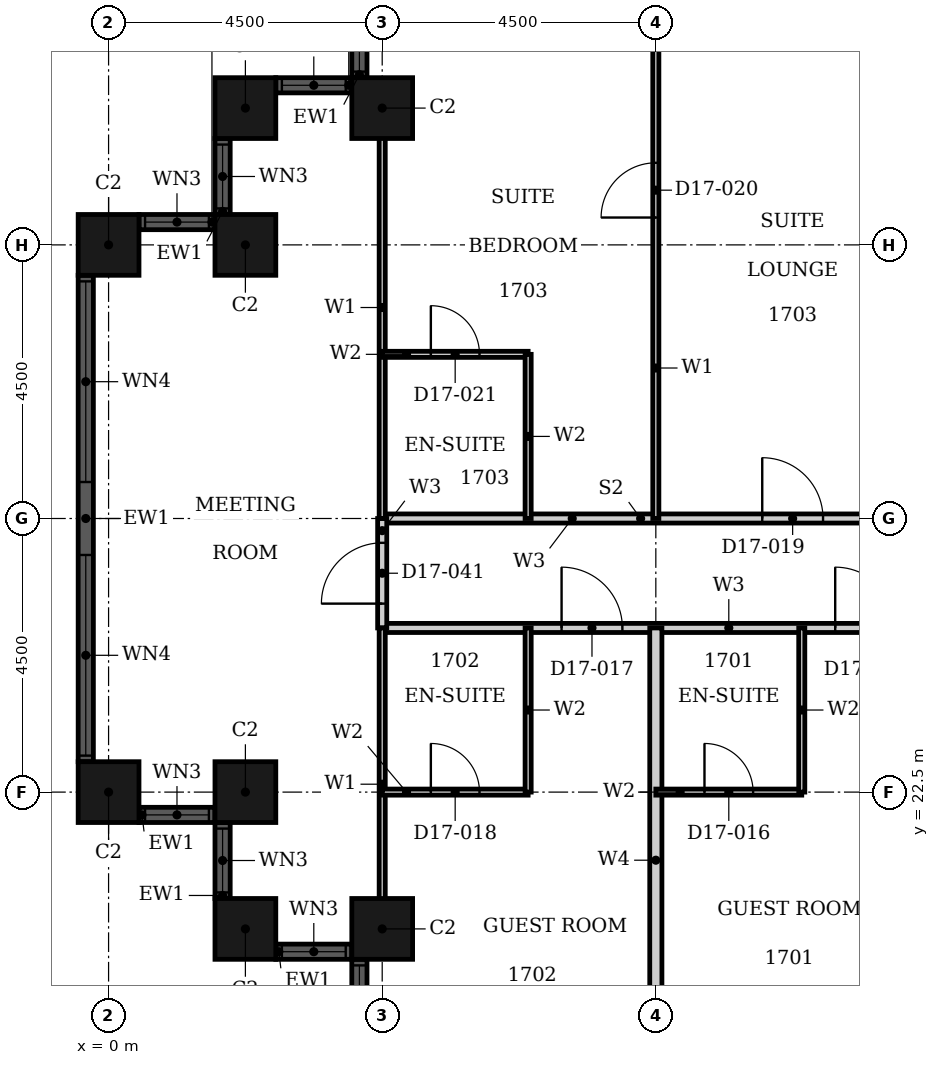
"""IFC4 building model, lengths in metres.
Left out: names, types, materials, properties, quantities, classifications, styles, units other than length and angle.
Written with IfcOpenShell. Run it as: python <this file> out.ifc"""

import sys

from ifc_helpers import new_model, si_unit, direction, frame, frame_2d, origin, origin_2d, place, context, subcontext, project, spatial, rectangle, hollow_rectangle, extrude, element, fill, save


model = new_model("IFC4")
c1 = context("Model", 3, precision=1e-05, world=origin(), true_north=direction((0.0, 1.0)))
c2 = subcontext(c1, "Body", "Model", "MODEL_VIEW")
j1 = project(units=[si_unit("LENGTHUNIT", "METRE"), si_unit("PLANEANGLEUNIT", "RADIAN")], contexts=[c1])
p1 = place(None, origin())
s1 = spatial("IfcSite", under=j1, at=p1, CompositionType="ELEMENT")
p2 = place(p1, origin())
s2 = spatial("IfcBuilding", under=s1, at=p2, CompositionType="ELEMENT")
p3 = place(p2, frame((0.0, 0.0, 74.4)))
s3 = spatial("IfcBuildingStorey", under=s2, at=p3, CompositionType="ELEMENT", Elevation=74.4)
for number, where, z_axis, x_axis in (
    (1, (4.5, 33.75, 0.0), (0.0, 0.0, 1.0), (1.0, 0.0, 0.0)),
    (2, (2.25, 33.75, 0.0), (0.0, 0.0, 1.0), (1.0, 0.0, 0.0)),
    (3, (2.25, 31.5, 0.0), (0.0, 0.0, 1.0), (1.0, 0.0, 0.0)),
    (4, (0.0, 31.5, 0.0), (0.0, 0.0, 1.0), (1.0, 0.0, 0.0)),
    (5, (0.0, 22.5, 0.0), (0.0, 0.0, 1.0), (1.0, 0.0, 0.0)),
    (6, (2.25, 22.5, 0.0), (0.0, 0.0, 1.0), (1.0, 0.0, 0.0)),
    (7, (2.25, 20.25, 0.0), (0.0, 0.0, 1.0), (1.0, 0.0, 0.0)),
    (8, (4.5, 20.25, 0.0), (0.0, 0.0, 1.0), (1.0, 0.0, 0.0)),
):
    element("IfcColumn", number, at=place(p3, frame(where, z_axis=z_axis, x_axis=x_axis)), inside=s3, PredefinedType="COLUMN", context=c2, shape_type="SweptSolid", body=[
        extrude(hollow_rectangle(XDim=1.0, YDim=1.0, WallThickness=0.032, at=origin_2d()), origin(), (0.0, 0.0, 1.0), 3.6),
    ])
p4 = place(p3, frame((4.125, 35.5, 0.0), z_axis=(0.0, 0.0, 1.0), x_axis=(0.0, -1.0, 0.0)))
e9 = element("IfcWall", 9, at=p4, inside=s3, PredefinedType="SOLIDWALL", context=c2, shape_type="SweptSolid", body=[
    extrude(rectangle(XDim=1.25, YDim=0.25, at=frame_2d((0.625, 0.0))), origin(), (0.0, 0.0, 1.0), 3.6),
])
p5 = place(p4, frame((0.1, 0.0, 0.9)))
e10 = element("IfcOpeningElement", 10, at=p5, cuts=e9, PredefinedType="OPENING", context=c2, shape_type="SweptSolid", body=[
    extrude(rectangle(XDim=1.05, YDim=2.08, at=frame_2d((0.525, 1.04))), frame((0.0, 0.135, 0.0), z_axis=(0.0, -1.0, 0.0), x_axis=(1.0, 0.0, 0.0)), (0.0, 0.0, 1.0), 0.27),
])
p6 = place(p3, frame((4.0, 34.125, 0.0), z_axis=(0.0, 0.0, 1.0), x_axis=(-1.0, 0.0, 0.0)))
e11 = element("IfcWall", 11, at=p6, inside=s3, PredefinedType="SOLIDWALL", context=c2, shape_type="SweptSolid", body=[
    extrude(rectangle(XDim=1.25, YDim=0.25, at=frame_2d((0.625, 0.0))), origin(), (0.0, 0.0, 1.0), 3.6),
])
p7 = place(p6, frame((0.1, 0.0, 0.9)))
e12 = element("IfcOpeningElement", 12, at=p7, cuts=e11, PredefinedType="OPENING", context=c2, shape_type="SweptSolid", body=[
    extrude(rectangle(XDim=1.05, YDim=2.08, at=frame_2d((0.525, 1.04))), frame((0.0, 0.135, 0.0), z_axis=(0.0, -1.0, 0.0), x_axis=(1.0, 0.0, 0.0)), (0.0, 0.0, 1.0), 0.27),
])
p8 = place(p3, frame((1.875, 33.25, 0.0), z_axis=(0.0, 0.0, 1.0), x_axis=(0.0, -1.0, 0.0)))
e13 = element("IfcWall", 13, at=p8, inside=s3, PredefinedType="SOLIDWALL", context=c2, shape_type="SweptSolid", body=[
    extrude(rectangle(XDim=1.25, YDim=0.25, at=frame_2d((0.625, 0.0))), origin(), (0.0, 0.0, 1.0), 3.6),
])
p9 = place(p8, frame((0.1, 0.0, 0.9)))
e14 = element("IfcOpeningElement", 14, at=p9, cuts=e13, PredefinedType="OPENING", context=c2, shape_type="SweptSolid", body=[
    extrude(rectangle(XDim=1.05, YDim=2.08, at=frame_2d((0.525, 1.04))), frame((0.0, 0.135, 0.0), z_axis=(0.0, -1.0, 0.0), x_axis=(1.0, 0.0, 0.0)), (0.0, 0.0, 1.0), 0.27),
])
p10 = place(p3, frame((1.75, 31.875, 0.0), z_axis=(0.0, 0.0, 1.0), x_axis=(-1.0, 0.0, 0.0)))
e15 = element("IfcWall", 15, at=p10, inside=s3, PredefinedType="SOLIDWALL", context=c2, shape_type="SweptSolid", body=[
    extrude(rectangle(XDim=1.25, YDim=0.25, at=frame_2d((0.625, 0.0))), origin(), (0.0, 0.0, 1.0), 3.6),
])
p11 = place(p10, frame((0.1, 0.0, 0.9)))
e16 = element("IfcOpeningElement", 16, at=p11, cuts=e15, PredefinedType="OPENING", context=c2, shape_type="SweptSolid", body=[
    extrude(rectangle(XDim=1.05, YDim=2.08, at=frame_2d((0.525, 1.04))), frame((0.0, 0.135, 0.0), z_axis=(0.0, -1.0, 0.0), x_axis=(1.0, 0.0, 0.0)), (0.0, 0.0, 1.0), 0.27),
])
p12 = place(p3, frame((-0.375, 31.0, 0.0), z_axis=(0.0, 0.0, 1.0), x_axis=(0.0, -1.0, 0.0)))
e17 = element("IfcWall", 17, at=p12, inside=s3, PredefinedType="SOLIDWALL", context=c2, shape_type="SweptSolid", body=[
    extrude(rectangle(XDim=8.0, YDim=0.25, at=frame_2d((4.0, 0.0))), origin(), (0.0, 0.0, 1.0), 3.6),
])
p13 = place(p12, frame((0.1, 0.0, 0.9)))
e18 = element("IfcOpeningElement", 18, at=p13, cuts=e17, PredefinedType="OPENING", context=c2, shape_type="SweptSolid", body=[
    extrude(rectangle(XDim=3.3, YDim=2.08, at=frame_2d((1.65, 1.04))), frame((0.0, 0.135, 0.0), z_axis=(0.0, -1.0, 0.0), x_axis=(1.0, 0.0, 0.0)), (0.0, 0.0, 1.0), 0.27),
])
p14 = place(p12, frame((4.6, 0.0, 0.9)))
e19 = element("IfcOpeningElement", 19, at=p14, cuts=e17, PredefinedType="OPENING", context=c2, shape_type="SweptSolid", body=[
    extrude(rectangle(XDim=3.3, YDim=2.08, at=frame_2d((1.65, 1.04))), frame((0.0, 0.135, 0.0), z_axis=(0.0, -1.0, 0.0), x_axis=(1.0, 0.0, 0.0)), (0.0, 0.0, 1.0), 0.27),
])
p15 = place(p3, frame((0.5, 22.125, 0.0), z_axis=(0.0, 0.0, 1.0), x_axis=(1.0, 0.0, 0.0)))
e20 = element("IfcWall", 20, at=p15, inside=s3, PredefinedType="SOLIDWALL", context=c2, shape_type="SweptSolid", body=[
    extrude(rectangle(XDim=1.25, YDim=0.25, at=frame_2d((0.625, 0.0))), origin(), (0.0, 0.0, 1.0), 3.6),
])
p16 = place(p15, frame((0.1, 0.0, 0.9)))
e21 = element("IfcOpeningElement", 21, at=p16, cuts=e20, PredefinedType="OPENING", context=c2, shape_type="SweptSolid", body=[
    extrude(rectangle(XDim=1.05, YDim=2.08, at=frame_2d((0.525, 1.04))), frame((0.0, 0.135, 0.0), z_axis=(0.0, -1.0, 0.0), x_axis=(1.0, 0.0, 0.0)), (0.0, 0.0, 1.0), 0.27),
])
p17 = place(p3, frame((1.875, 22.0, 0.0), z_axis=(0.0, 0.0, 1.0), x_axis=(0.0, -1.0, 0.0)))
e22 = element("IfcWall", 22, at=p17, inside=s3, PredefinedType="SOLIDWALL", context=c2, shape_type="SweptSolid", body=[
    extrude(rectangle(XDim=1.25, YDim=0.25, at=frame_2d((0.625, 0.0))), origin(), (0.0, 0.0, 1.0), 3.6),
])
p18 = place(p17, frame((0.1, 0.0, 0.9)))
e23 = element("IfcOpeningElement", 23, at=p18, cuts=e22, PredefinedType="OPENING", context=c2, shape_type="SweptSolid", body=[
    extrude(rectangle(XDim=1.05, YDim=2.08, at=frame_2d((0.525, 1.04))), frame((0.0, 0.135, 0.0), z_axis=(0.0, -1.0, 0.0), x_axis=(1.0, 0.0, 0.0)), (0.0, 0.0, 1.0), 0.27),
])
p19 = place(p3, frame((2.75, 19.875, 0.0), z_axis=(0.0, 0.0, 1.0), x_axis=(1.0, 0.0, 0.0)))
e24 = element("IfcWall", 24, at=p19, inside=s3, PredefinedType="SOLIDWALL", context=c2, shape_type="SweptSolid", body=[
    extrude(rectangle(XDim=1.25, YDim=0.25, at=frame_2d((0.625, 0.0))), origin(), (0.0, 0.0, 1.0), 3.6),
])
p20 = place(p19, frame((0.1, 0.0, 0.9)))
e25 = element("IfcOpeningElement", 25, at=p20, cuts=e24, PredefinedType="OPENING", context=c2, shape_type="SweptSolid", body=[
    extrude(rectangle(XDim=1.05, YDim=2.08, at=frame_2d((0.525, 1.04))), frame((0.0, 0.135, 0.0), z_axis=(0.0, -1.0, 0.0), x_axis=(1.0, 0.0, 0.0)), (0.0, 0.0, 1.0), 0.27),
])
p21 = place(p3, frame((4.125, 19.75, 0.0), z_axis=(0.0, 0.0, 1.0), x_axis=(0.0, -1.0, 0.0)))
e26 = element("IfcWall", 26, at=p21, inside=s3, PredefinedType="SOLIDWALL", context=c2, shape_type="SweptSolid", body=[
    extrude(rectangle(XDim=1.25, YDim=0.25, at=frame_2d((0.625, 0.0))), origin(), (0.0, 0.0, 1.0), 3.6),
])
p22 = place(p21, frame((0.1, 0.0, 0.9)))
e27 = element("IfcOpeningElement", 27, at=p22, cuts=e26, PredefinedType="OPENING", context=c2, shape_type="SweptSolid", body=[
    extrude(rectangle(XDim=1.05, YDim=2.08, at=frame_2d((0.525, 1.04))), frame((0.0, 0.135, 0.0), z_axis=(0.0, -1.0, 0.0), x_axis=(1.0, 0.0, 0.0)), (0.0, 0.0, 1.0), 0.27),
])
p23 = place(p3, frame((4.5, 25.2, 0.0), z_axis=(0.0, 0.0, 1.0), x_axis=(1.0, 0.0, 0.0)))
e28 = element("IfcWall", 28, at=p23, inside=s3, PredefinedType="PARTITIONING", context=c2, shape_type="SweptSolid", body=[
    extrude(rectangle(XDim=11.7, YDim=0.15, at=frame_2d((5.85, 0.0))), origin(), (0.0, 0.0, 1.0), 3.3),
])
p24 = place(p23, frame((7.45, 0.0, 0.0)))
e29 = element("IfcOpeningElement", 29, at=p24, cuts=e28, PredefinedType="OPENING", context=c2, shape_type="SweptSolid", body=[
    extrude(rectangle(XDim=1.0, YDim=2.1, at=frame_2d((0.5, 1.05))), frame((0.0, 0.085, 0.0), z_axis=(0.0, -1.0, 0.0), x_axis=(1.0, 0.0, 0.0)), (0.0, 0.0, 1.0), 0.17),
])
p25 = place(p23, frame((2.95, 0.0, 0.0)))
e30 = element("IfcOpeningElement", 30, at=p25, cuts=e28, PredefinedType="OPENING", context=c2, shape_type="SweptSolid", body=[
    extrude(rectangle(XDim=1.0, YDim=2.1, at=frame_2d((0.5, 1.05))), frame((0.0, 0.085, 0.0), z_axis=(0.0, -1.0, 0.0), x_axis=(1.0, 0.0, 0.0)), (0.0, 0.0, 1.0), 0.17),
])
p26 = place(p3, frame((4.5, 27.0, 0.0), z_axis=(0.0, 0.0, 1.0), x_axis=(1.0, 0.0, 0.0)))
e31 = element("IfcWall", 31, at=p26, inside=s3, PredefinedType="PARTITIONING", context=c2, shape_type="SweptSolid", body=[
    extrude(rectangle(XDim=11.7, YDim=0.15, at=frame_2d((5.85, 0.0))), origin(), (0.0, 0.0, 1.0), 2.58),
])
p27 = place(p26, frame((6.25, 0.0, 0.0)))
e32 = element("IfcOpeningElement", 32, at=p27, cuts=e31, PredefinedType="OPENING", context=c2, shape_type="SweptSolid", body=[
    extrude(rectangle(XDim=1.0, YDim=2.1, at=frame_2d((0.5, 1.05))), frame((0.0, 0.085, 0.0), z_axis=(0.0, -1.0, 0.0), x_axis=(1.0, 0.0, 0.0)), (0.0, 0.0, 1.0), 0.17),
])
p28 = place(p3, frame((4.5, 25.2, 0.0), z_axis=(0.0, 0.0, 1.0), x_axis=(0.0, 1.0, 0.0)))
e33 = element("IfcWall", 33, at=p28, inside=s3, PredefinedType="PARTITIONING", context=c2, shape_type="SweptSolid", body=[
    extrude(rectangle(XDim=1.8, YDim=0.15, at=frame_2d((0.9, 0.0))), origin(), (0.0, 0.0, 1.0), 3.3),
])
p29 = place(p28, frame((0.4, 0.0, 0.0)))
e34 = element("IfcOpeningElement", 34, at=p29, cuts=e33, PredefinedType="OPENING", context=c2, shape_type="SweptSolid", body=[
    extrude(rectangle(XDim=1.0, YDim=2.1, at=frame_2d((0.5, 1.05))), frame((0.0, 0.085, 0.0), z_axis=(0.0, -1.0, 0.0), x_axis=(1.0, 0.0, 0.0)), (0.0, 0.0, 1.0), 0.17),
])
p30 = place(p3, frame((4.5, 20.06, 0.0), z_axis=(0.0, 0.0, 1.0), x_axis=(0.0, 1.0, 0.0)))
e35 = element("IfcWall", 35, at=p30, inside=s3, PredefinedType="PARTITIONING", context=c2, shape_type="SweptSolid", body=[
    extrude(rectangle(XDim=5.14, YDim=0.1, at=frame_2d((2.57, 0.0))), origin(), (0.0, 0.0, 1.0), 3.3),
])
p31 = place(p3, frame((4.5, 27.0, 0.0), z_axis=(0.0, 0.0, 1.0), x_axis=(0.0, 1.0, 0.0)))
e36 = element("IfcWall", 36, at=p31, inside=s3, PredefinedType="PARTITIONING", context=c2, shape_type="SweptSolid", body=[
    extrude(rectangle(XDim=6.94, YDim=0.1, at=frame_2d((3.47, 0.0))), origin(), (0.0, 0.0, 1.0), 3.3),
])
p32 = place(p3, frame((9.0, 27.0, 0.0), z_axis=(0.0, 0.0, 1.0), x_axis=(0.0, 1.0, 0.0)))
e37 = element("IfcWall", 37, at=p32, inside=s3, PredefinedType="PARTITIONING", context=c2, shape_type="SweptSolid", body=[
    extrude(rectangle(XDim=9.44, YDim=0.1, at=frame_2d((4.72, 0.0))), origin(), (0.0, 0.0, 1.0), 3.3),
])
p33 = place(p32, frame((4.95, 0.0, 0.0)))
e38 = element("IfcOpeningElement", 38, at=p33, cuts=e37, PredefinedType="OPENING", context=c2, shape_type="SweptSolid", body=[
    extrude(rectangle(XDim=0.9, YDim=2.1, at=frame_2d((0.45, 1.05))), frame((0.0, 0.06, 0.0), z_axis=(0.0, -1.0, 0.0), x_axis=(1.0, 0.0, 0.0)), (0.0, 0.0, 1.0), 0.12),
])
p34 = place(p3, frame((9.0, 17.56, 0.0), z_axis=(0.0, 0.0, 1.0), x_axis=(0.0, 1.0, 0.0)))
e39 = element("IfcWall", 39, at=p34, inside=s3, PredefinedType="PARTITIONING", context=c2, shape_type="SweptSolid", body=[
    extrude(rectangle(XDim=7.64, YDim=0.2, at=frame_2d((3.82, 0.0))), origin(), (0.0, 0.0, 1.0), 3.3),
])
p35 = place(p3, frame((9.0, 22.5, 0.0), z_axis=(0.0, 0.0, 1.0), x_axis=(1.0, 0.0, 0.0)))
e40 = element("IfcWall", 40, at=p35, inside=s3, PredefinedType="PARTITIONING", context=c2, shape_type="SweptSolid", body=[
    extrude(rectangle(XDim=2.4, YDim=0.1, at=frame_2d((1.2, 0.0))), origin(), (0.0, 0.0, 1.0), 2.58),
])
p36 = place(p35, frame((0.8, 0.0, 0.0)))
e41 = element("IfcOpeningElement", 41, at=p36, cuts=e40, PredefinedType="OPENING", context=c2, shape_type="SweptSolid", body=[
    extrude(rectangle(XDim=0.8, YDim=2.1, at=frame_2d((0.4, 1.05))), frame((0.0, 0.06, 0.0), z_axis=(0.0, -1.0, 0.0), x_axis=(1.0, 0.0, 0.0)), (0.0, 0.0, 1.0), 0.12),
])
p37 = place(p3, frame((4.5, 22.5, 0.0), z_axis=(0.0, 0.0, 1.0), x_axis=(1.0, 0.0, 0.0)))
e42 = element("IfcWall", 42, at=p37, inside=s3, PredefinedType="PARTITIONING", context=c2, shape_type="SweptSolid", body=[
    extrude(rectangle(XDim=2.4, YDim=0.1, at=frame_2d((1.2, 0.0))), origin(), (0.0, 0.0, 1.0), 2.58),
])
p38 = place(p37, frame((0.8, 0.0, 0.0)))
e43 = element("IfcOpeningElement", 43, at=p38, cuts=e42, PredefinedType="OPENING", context=c2, shape_type="SweptSolid", body=[
    extrude(rectangle(XDim=0.8, YDim=2.1, at=frame_2d((0.4, 1.05))), frame((0.0, 0.06, 0.0), z_axis=(0.0, -1.0, 0.0), x_axis=(1.0, 0.0, 0.0)), (0.0, 0.0, 1.0), 0.12),
])
p39 = place(p3, frame((4.5, 29.7, 0.0), z_axis=(0.0, 0.0, 1.0), x_axis=(1.0, 0.0, 0.0)))
e44 = element("IfcWall", 44, at=p39, inside=s3, PredefinedType="PARTITIONING", context=c2, shape_type="SweptSolid", body=[
    extrude(rectangle(XDim=2.4, YDim=0.1, at=frame_2d((1.2, 0.0))), origin(), (0.0, 0.0, 1.0), 3.3),
])
p40 = place(p39, frame((0.8, 0.0, 0.0)))
e45 = element("IfcOpeningElement", 45, at=p40, cuts=e44, PredefinedType="OPENING", context=c2, shape_type="SweptSolid", body=[
    extrude(rectangle(XDim=0.8, YDim=2.1, at=frame_2d((0.4, 1.05))), frame((0.0, 0.06, 0.0), z_axis=(0.0, -1.0, 0.0), x_axis=(1.0, 0.0, 0.0)), (0.0, 0.0, 1.0), 0.12),
])
for number, where, z_axis, x_axis in (
    (46, (11.4, 22.5, 0.0), (0.0, 0.0, 1.0), (0.0, 1.0, 0.0)),
    (47, (6.9, 22.5, 0.0), (0.0, 0.0, 1.0), (0.0, 1.0, 0.0)),
    (48, (6.9, 27.0, 0.0), (0.0, 0.0, 1.0), (0.0, 1.0, 0.0)),
):
    element("IfcWall", number, at=place(p3, frame(where, z_axis=z_axis, x_axis=x_axis)), inside=s3, PredefinedType="PARTITIONING", context=c2, shape_type="SweptSolid", body=[
        extrude(rectangle(XDim=2.7, YDim=0.1, at=frame_2d((1.35, 0.0))), origin(), (0.0, 0.0, 1.0), 3.3),
    ])
p41 = place(p5, origin())
e49 = element("IfcWindow", 49, at=p41, inside=s3, PartitioningType="SINGLE_PANEL", PredefinedType="WINDOW", context=c2, shape_type="SweptSolid", body=[
    extrude(rectangle(XDim=1.05, YDim=2.08, at=frame_2d((0.525, 1.04))), frame((0.0, 0.03, 0.0), z_axis=(0.0, -1.0, 0.0), x_axis=(1.0, 0.0, 0.0)), (0.0, 0.0, 1.0), 0.06),
])
fill(e10, e49)
p42 = place(p7, origin())
e50 = element("IfcWindow", 50, at=p42, inside=s3, PartitioningType="SINGLE_PANEL", PredefinedType="WINDOW", context=c2, shape_type="SweptSolid", body=[
    extrude(rectangle(XDim=1.05, YDim=2.08, at=frame_2d((0.525, 1.04))), frame((0.0, 0.03, 0.0), z_axis=(0.0, -1.0, 0.0), x_axis=(1.0, 0.0, 0.0)), (0.0, 0.0, 1.0), 0.06),
])
fill(e12, e50)
p43 = place(p9, origin())
e51 = element("IfcWindow", 51, at=p43, inside=s3, PartitioningType="SINGLE_PANEL", PredefinedType="WINDOW", context=c2, shape_type="SweptSolid", body=[
    extrude(rectangle(XDim=1.05, YDim=2.08, at=frame_2d((0.525, 1.04))), frame((0.0, 0.03, 0.0), z_axis=(0.0, -1.0, 0.0), x_axis=(1.0, 0.0, 0.0)), (0.0, 0.0, 1.0), 0.06),
])
fill(e14, e51)
p44 = place(p11, origin())
e52 = element("IfcWindow", 52, at=p44, inside=s3, PartitioningType="SINGLE_PANEL", PredefinedType="WINDOW", context=c2, shape_type="SweptSolid", body=[
    extrude(rectangle(XDim=1.05, YDim=2.08, at=frame_2d((0.525, 1.04))), frame((0.0, 0.03, 0.0), z_axis=(0.0, -1.0, 0.0), x_axis=(1.0, 0.0, 0.0)), (0.0, 0.0, 1.0), 0.06),
])
fill(e16, e52)
p45 = place(p13, origin())
e53 = element("IfcWindow", 53, at=p45, inside=s3, PartitioningType="SINGLE_PANEL", PredefinedType="WINDOW", context=c2, shape_type="SweptSolid", body=[
    extrude(rectangle(XDim=3.3, YDim=2.08, at=frame_2d((1.65, 1.04))), frame((0.0, 0.03, 0.0), z_axis=(0.0, -1.0, 0.0), x_axis=(1.0, 0.0, 0.0)), (0.0, 0.0, 1.0), 0.06),
])
fill(e18, e53)
p46 = place(p14, origin())
e54 = element("IfcWindow", 54, at=p46, inside=s3, PartitioningType="SINGLE_PANEL", PredefinedType="WINDOW", context=c2, shape_type="SweptSolid", body=[
    extrude(rectangle(XDim=3.3, YDim=2.08, at=frame_2d((1.65, 1.04))), frame((0.0, 0.03, 0.0), z_axis=(0.0, -1.0, 0.0), x_axis=(1.0, 0.0, 0.0)), (0.0, 0.0, 1.0), 0.06),
])
fill(e19, e54)
p47 = place(p16, origin())
e55 = element("IfcWindow", 55, at=p47, inside=s3, PartitioningType="SINGLE_PANEL", PredefinedType="WINDOW", context=c2, shape_type="SweptSolid", body=[
    extrude(rectangle(XDim=1.05, YDim=2.08, at=frame_2d((0.525, 1.04))), frame((0.0, 0.03, 0.0), z_axis=(0.0, -1.0, 0.0), x_axis=(1.0, 0.0, 0.0)), (0.0, 0.0, 1.0), 0.06),
])
fill(e21, e55)
p48 = place(p18, origin())
e56 = element("IfcWindow", 56, at=p48, inside=s3, PartitioningType="SINGLE_PANEL", PredefinedType="WINDOW", context=c2, shape_type="SweptSolid", body=[
    extrude(rectangle(XDim=1.05, YDim=2.08, at=frame_2d((0.525, 1.04))), frame((0.0, 0.03, 0.0), z_axis=(0.0, -1.0, 0.0), x_axis=(1.0, 0.0, 0.0)), (0.0, 0.0, 1.0), 0.06),
])
fill(e23, e56)
p49 = place(p20, origin())
e57 = element("IfcWindow", 57, at=p49, inside=s3, PartitioningType="SINGLE_PANEL", PredefinedType="WINDOW", context=c2, shape_type="SweptSolid", body=[
    extrude(rectangle(XDim=1.05, YDim=2.08, at=frame_2d((0.525, 1.04))), frame((0.0, 0.03, 0.0), z_axis=(0.0, -1.0, 0.0), x_axis=(1.0, 0.0, 0.0)), (0.0, 0.0, 1.0), 0.06),
])
fill(e25, e57)
p50 = place(p22, origin())
e58 = element("IfcWindow", 58, at=p50, inside=s3, PartitioningType="SINGLE_PANEL", PredefinedType="WINDOW", context=c2, shape_type="SweptSolid", body=[
    extrude(rectangle(XDim=1.05, YDim=2.08, at=frame_2d((0.525, 1.04))), frame((0.0, 0.03, 0.0), z_axis=(0.0, -1.0, 0.0), x_axis=(1.0, 0.0, 0.0)), (0.0, 0.0, 1.0), 0.06),
])
fill(e27, e58)
p51 = place(p24, origin())
e59 = element("IfcDoor", 59, at=p51, inside=s3, OperationType="SINGLE_SWING_RIGHT", PredefinedType="DOOR", context=c2, shape_type="SweptSolid", body=[
    extrude(rectangle(XDim=1.0, YDim=2.1, at=frame_2d((0.5, 1.05))), frame((0.0, 0.025, 0.0), z_axis=(0.0, -1.0, 0.0), x_axis=(1.0, 0.0, 0.0)), (0.0, 0.0, 1.0), 0.05),
])
fill(e29, e59)
p52 = place(p36, origin())
e60 = element("IfcDoor", 60, at=p52, inside=s3, OperationType="SINGLE_SWING_LEFT", PredefinedType="DOOR", context=c2, shape_type="SweptSolid", body=[
    extrude(rectangle(XDim=0.8, YDim=2.1, at=frame_2d((0.4, 1.05))), frame((0.0, 0.025, 0.0), z_axis=(0.0, -1.0, 0.0), x_axis=(1.0, 0.0, 0.0)), (0.0, 0.0, 1.0), 0.05),
])
fill(e41, e60)
p53 = place(p25, origin())
e61 = element("IfcDoor", 61, at=p53, inside=s3, OperationType="SINGLE_SWING_RIGHT", PredefinedType="DOOR", context=c2, shape_type="SweptSolid", body=[
    extrude(rectangle(XDim=1.0, YDim=2.1, at=frame_2d((0.5, 1.05))), frame((0.0, 0.025, 0.0), z_axis=(0.0, -1.0, 0.0), x_axis=(1.0, 0.0, 0.0)), (0.0, 0.0, 1.0), 0.05),
])
fill(e30, e61)
p54 = place(p38, origin())
e62 = element("IfcDoor", 62, at=p54, inside=s3, OperationType="SINGLE_SWING_RIGHT", PredefinedType="DOOR", context=c2, shape_type="SweptSolid", body=[
    extrude(rectangle(XDim=0.8, YDim=2.1, at=frame_2d((0.4, 1.05))), frame((0.0, 0.025, 0.0), z_axis=(0.0, -1.0, 0.0), x_axis=(1.0, 0.0, 0.0)), (0.0, 0.0, 1.0), 0.05),
])
fill(e43, e62)
p55 = place(p27, origin())
e63 = element("IfcDoor", 63, at=p55, inside=s3, OperationType="SINGLE_SWING_LEFT", PredefinedType="DOOR", context=c2, shape_type="SweptSolid", body=[
    extrude(rectangle(XDim=1.0, YDim=2.1, at=frame_2d((0.5, 1.05))), frame((0.0, 0.025, 0.0), z_axis=(0.0, -1.0, 0.0), x_axis=(1.0, 0.0, 0.0)), (0.0, 0.0, 1.0), 0.05),
])
fill(e32, e63)
p56 = place(p33, origin())
e64 = element("IfcDoor", 64, at=p56, inside=s3, OperationType="SINGLE_SWING_RIGHT", PredefinedType="DOOR", context=c2, shape_type="SweptSolid", body=[
    extrude(rectangle(XDim=0.9, YDim=2.1, at=frame_2d((0.45, 1.05))), frame((0.0, 0.025, 0.0), z_axis=(0.0, -1.0, 0.0), x_axis=(1.0, 0.0, 0.0)), (0.0, 0.0, 1.0), 0.05),
])
fill(e38, e64)
p57 = place(p40, origin())
e65 = element("IfcDoor", 65, at=p57, inside=s3, OperationType="SINGLE_SWING_LEFT", PredefinedType="DOOR", context=c2, shape_type="SweptSolid", body=[
    extrude(rectangle(XDim=0.8, YDim=2.1, at=frame_2d((0.4, 1.05))), frame((0.0, 0.025, 0.0), z_axis=(0.0, -1.0, 0.0), x_axis=(1.0, 0.0, 0.0)), (0.0, 0.0, 1.0), 0.05),
])
fill(e45, e65)
p58 = place(p29, origin())
e66 = element("IfcDoor", 66, at=p58, inside=s3, OperationType="SINGLE_SWING_RIGHT", PredefinedType="DOOR", context=c2, shape_type="SweptSolid", body=[
    extrude(rectangle(XDim=1.0, YDim=2.1, at=frame_2d((0.5, 1.05))), frame((0.0, 0.025, 0.0), z_axis=(0.0, -1.0, 0.0), x_axis=(1.0, 0.0, 0.0)), (0.0, 0.0, 1.0), 0.05),
])
fill(e34, e66)
save(model, sys.argv[1])
